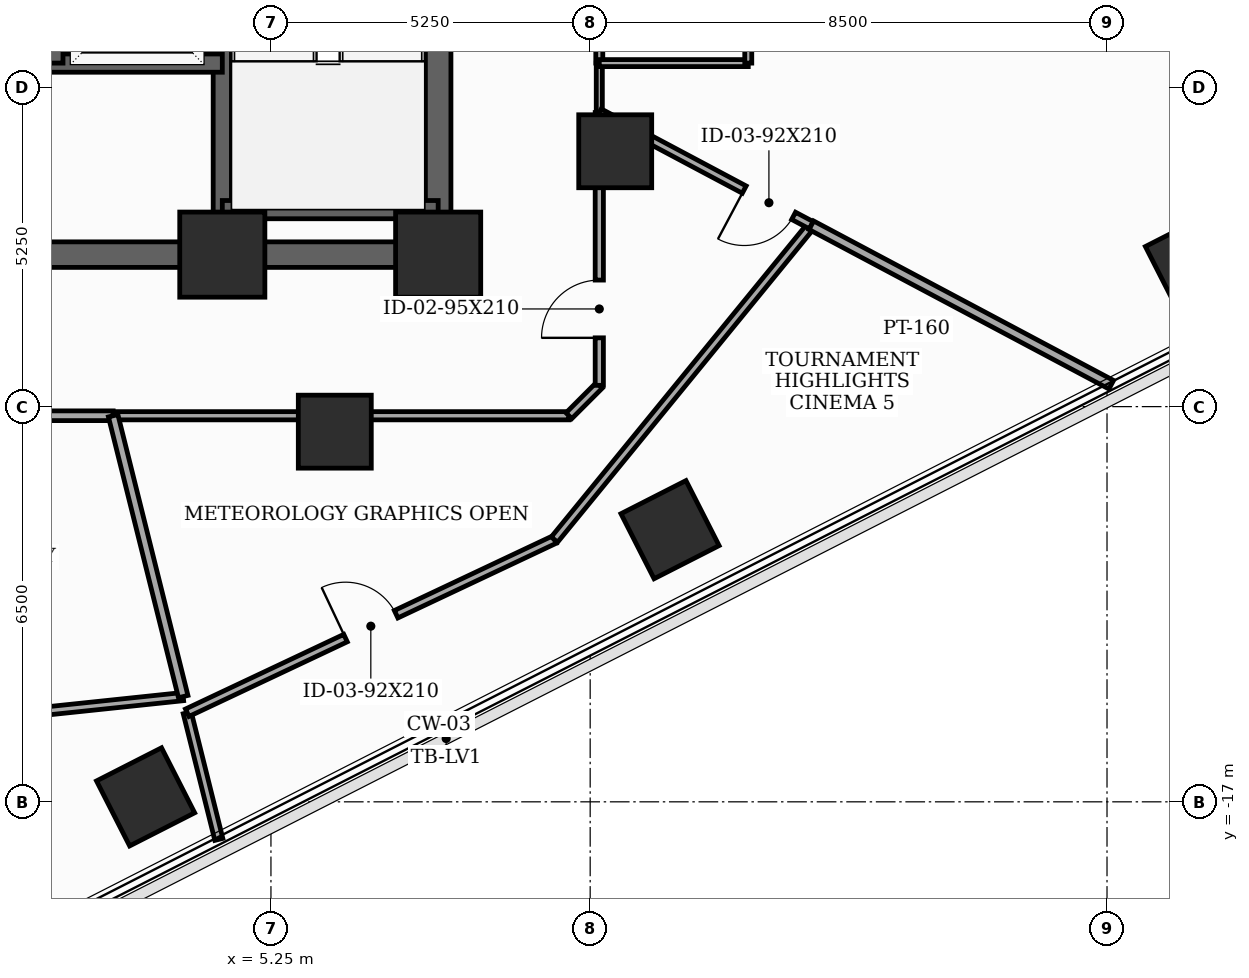
"""IFC4 building model, lengths in metres.
Left out: names, types, materials, properties, quantities, classifications, styles, units other than length and angle.
Written with IfcOpenShell. Run it as: python <this file> out.ifc"""

import sys

from ifc_helpers import new_model, si_unit, direction, frame, frame_2d, origin, origin_2d, place, context, subcontext, project, spatial, rectangle, extrude, element, fill, save


model = new_model("IFC4")
c1 = context("Model", 3, precision=1e-05, world=origin(), true_north=direction((0.0, 1.0)))
c2 = subcontext(c1, "Body", "Model", "MODEL_VIEW")
j1 = project(units=[si_unit("LENGTHUNIT", "METRE"), si_unit("PLANEANGLEUNIT", "RADIAN")], contexts=[c1])
p1 = place(None, origin())
s1 = spatial("IfcSite", under=j1, at=p1, CompositionType="ELEMENT")
p2 = place(p1, origin())
s2 = spatial("IfcBuilding", under=s1, at=p2, CompositionType="ELEMENT")
p3 = place(p2, frame((0.0, 0.0, 119.9)))
s3 = spatial("IfcBuildingStorey", under=s2, at=p3, CompositionType="ELEMENT", Elevation=119.9)
for number, where, z_axis, x_axis in (
    (1, (4.45, -8.0, 0.0), (0.0, 0.0, 1.0), (1.0, 0.0, 0.0)),
    (2, (8.0, -8.0, 0.0), (0.0, 0.0, 1.0), (1.0, 0.0, 0.0)),
):
    element("IfcColumn", number, at=place(p3, frame(where, z_axis=z_axis, x_axis=x_axis)), inside=s3, PredefinedType="COLUMN", context=c2, shape_type="SweptSolid", body=[
        extrude(rectangle(XDim=1.4, YDim=1.4, at=origin_2d()), origin(), (0.0, 0.0, 1.0), 3.7),
    ])
for number, where, z_axis, x_axis in (
    (3, (6.3, -10.912, 0.0), (0.0, 0.0, 1.0), (1.0, 0.0, 0.0)),
    (4, (10.912, -6.3, 0.0), (0.0, 0.0, 1.0), (1.0, 0.0, 0.0)),
    (5, (3.188, -16.918, 0.0), (0.0, 0.0, 1.0), (0.891, 0.454, 0.0)),
    (6, (11.813, -12.524, 0.0), (0.0, 0.0, 1.0), (0.891, 0.454, 0.0)),
    (7, (20.438, -8.129, 0.0), (0.0, 0.0, 1.0), (0.891, 0.454, 0.0)),
):
    element("IfcColumn", number, at=place(p3, frame(where, z_axis=z_axis, x_axis=x_axis)), inside=s3, PredefinedType="COLUMN", context=c2, shape_type="SweptSolid", body=[
        extrude(rectangle(XDim=1.2, YDim=1.2, at=origin_2d()), origin(), (0.0, 0.0, 1.0), 3.7),
    ])
p4 = place(p3, frame((8.0, -8.0, 0.0), z_axis=(0.0, 0.0, 1.0), x_axis=(0.0, 1.0, 0.0)))
e8 = element("IfcWall", 8, at=p4, inside=s3, PredefinedType="SHEAR", context=c2, shape_type="SweptSolid", body=[
    extrude(rectangle(XDim=16.0, YDim=0.42, at=frame_2d((8.0, 0.0))), origin(), (0.0, 0.0, 1.0), 3.5),
])
p5 = place(p4, frame((9.6, 0.0, 0.0)))
e9 = element("IfcOpeningElement", 9, at=p5, cuts=e8, PredefinedType="OPENING", context=c2, shape_type="SweptSolid", body=[
    extrude(rectangle(XDim=1.05, YDim=2.15, at=frame_2d((0.525, 1.075))), frame((0.0, 0.22, 0.0), z_axis=(0.0, -1.0, 0.0), x_axis=(1.0, 0.0, 0.0)), (0.0, 0.0, 1.0), 0.44),
])
p6 = place(p4, frame((14.229, 0.0, 0.0)))
e10 = element("IfcOpeningElement", 10, at=p6, cuts=e8, PredefinedType="OPENING", context=c2, shape_type="SweptSolid", body=[
    extrude(rectangle(XDim=0.85, YDim=2.02, at=frame_2d((0.425, 1.01))), frame((0.0, 0.22, 0.0), z_axis=(0.0, -1.0, 0.0), x_axis=(1.0, 0.0, 0.0)), (0.0, 0.0, 1.0), 0.44),
])
p7 = place(p3, frame((-8.0, -8.0, 0.0), z_axis=(0.0, 0.0, 1.0), x_axis=(1.0, 0.0, 0.0)))
e11 = element("IfcWall", 11, at=p7, inside=s3, PredefinedType="SHEAR", context=c2, shape_type="SweptSolid", body=[
    extrude(rectangle(XDim=16.0, YDim=0.42, at=frame_2d((8.0, 0.0))), origin(), (0.0, 0.0, 1.0), 3.5),
])
p8 = place(p7, frame((7.52, 0.0, 0.0)))
e12 = element("IfcOpeningElement", 12, at=p8, cuts=e11, PredefinedType="OPENING", context=c2, shape_type="SweptSolid", body=[
    extrude(rectangle(XDim=0.95, YDim=2.1, at=frame_2d((0.475, 1.05))), frame((0.0, 0.22, 0.0), z_axis=(0.0, -1.0, 0.0), x_axis=(1.0, 0.0, 0.0)), (0.0, 0.0, 1.0), 0.44),
])
p9 = place(p3, frame((4.45, -7.79, 0.0), z_axis=(0.0, 0.0, 1.0), x_axis=(0.0, 1.0, 0.0)))
e13 = element("IfcWall", 13, at=p9, inside=s3, PredefinedType="SHEAR", context=c2, shape_type="SweptSolid", body=[
    extrude(rectangle(XDim=15.58, YDim=0.3, at=frame_2d((7.79, 0.0))), origin(), (0.0, 0.0, 1.0), 3.5),
])
p10 = place(p3, frame((4.45, -7.26, 0.0), z_axis=(0.0, 0.0, 1.0), x_axis=(1.0, 0.0, 0.0)))
e14 = element("IfcWall", 14, at=p10, inside=s3, PredefinedType="SHEAR", context=c2, shape_type="SweptSolid", body=[
    extrude(rectangle(XDim=3.55, YDim=0.3, at=frame_2d((1.775, 0.0))), origin(), (0.0, 0.0, 1.0), 3.5),
])
p11 = place(p3, frame((-4.45, -4.85, 0.0), z_axis=(0.0, 0.0, 1.0), x_axis=(1.0, 0.0, 0.0)))
e15 = element("IfcWall", 15, at=p11, inside=s3, PredefinedType="SHEAR", context=c2, shape_type="SweptSolid", body=[
    extrude(rectangle(XDim=8.9, YDim=0.3, at=frame_2d((4.45, 0.0))), origin(), (0.0, 0.0, 1.0), 3.5),
])
p12 = place(p3, frame((1.68, -4.85, 0.0), z_axis=(0.0, 0.0, 1.0), x_axis=(0.0, 1.0, 0.0)))
e16 = element("IfcWall", 16, at=p12, inside=s3, PredefinedType="SHEAR", context=c2, shape_type="SweptSolid", body=[
    extrude(rectangle(XDim=12.64, YDim=0.3, at=frame_2d((6.32, 0.0))), origin(), (0.0, 0.0, 1.0), 3.5),
])
p13 = place(p12, frame((0.55, 0.0, 0.0)))
e17 = element("IfcOpeningElement", 17, at=p13, cuts=e16, PredefinedType="OPENING", context=c2, shape_type="SweptSolid", body=[
    extrude(rectangle(XDim=1.1, YDim=2.1, at=frame_2d((0.55, 1.05))), frame((0.0, 0.16, 0.0), z_axis=(0.0, -1.0, 0.0), x_axis=(1.0, 0.0, 0.0)), (0.0, 0.0, 1.0), 0.32),
])
p14 = place(p12, frame((2.65, 0.0, 0.0)))
e18 = element("IfcOpeningElement", 18, at=p14, cuts=e16, PredefinedType="OPENING", context=c2, shape_type="SweptSolid", body=[
    extrude(rectangle(XDim=1.1, YDim=2.1, at=frame_2d((0.55, 1.05))), frame((0.0, 0.16, 0.0), z_axis=(0.0, -1.0, 0.0), x_axis=(1.0, 0.0, 0.0)), (0.0, 0.0, 1.0), 0.32),
])
p15 = place(p12, frame((4.75, 0.0, 0.0)))
e19 = element("IfcOpeningElement", 19, at=p15, cuts=e16, PredefinedType="OPENING", context=c2, shape_type="SweptSolid", body=[
    extrude(rectangle(XDim=1.1, YDim=2.1, at=frame_2d((0.55, 1.05))), frame((0.0, 0.16, 0.0), z_axis=(0.0, -1.0, 0.0), x_axis=(1.0, 0.0, 0.0)), (0.0, 0.0, 1.0), 0.32),
])
p16 = place(p12, frame((6.85, 0.0, 0.0)))
e20 = element("IfcOpeningElement", 20, at=p16, cuts=e16, PredefinedType="OPENING", context=c2, shape_type="SweptSolid", body=[
    extrude(rectangle(XDim=1.1, YDim=2.1, at=frame_2d((0.55, 1.05))), frame((0.0, 0.16, 0.0), z_axis=(0.0, -1.0, 0.0), x_axis=(1.0, 0.0, 0.0)), (0.0, 0.0, 1.0), 0.32),
])
p17 = place(p12, frame((8.95, 0.0, 0.0)))
e21 = element("IfcOpeningElement", 21, at=p17, cuts=e16, PredefinedType="OPENING", context=c2, shape_type="SweptSolid", body=[
    extrude(rectangle(XDim=1.1, YDim=2.1, at=frame_2d((0.55, 1.05))), frame((0.0, 0.16, 0.0), z_axis=(0.0, -1.0, 0.0), x_axis=(1.0, 0.0, 0.0)), (0.0, 0.0, 1.0), 0.32),
])
p18 = place(p12, frame((11.05, 0.0, 0.0)))
e22 = element("IfcOpeningElement", 22, at=p18, cuts=e16, PredefinedType="OPENING", context=c2, shape_type="SweptSolid", body=[
    extrude(rectangle(XDim=1.1, YDim=2.1, at=frame_2d((0.55, 1.05))), frame((0.0, 0.16, 0.0), z_axis=(0.0, -1.0, 0.0), x_axis=(1.0, 0.0, 0.0)), (0.0, 0.0, 1.0), 0.32),
])
p19 = place(p3, frame((-8.936, -10.65, 0.0), z_axis=(0.0, 0.0, 1.0), x_axis=(1.0, 0.0, 0.0)))
e23 = element("IfcWall", 23, at=p19, inside=s3, PredefinedType="PARTITIONING", context=c2, shape_type="SweptSolid", body=[
    extrude(rectangle(XDim=11.591, YDim=0.16, at=frame_2d((5.795, 0.0))), origin(), (0.0, 0.0, 1.0), 2.785),
])
p20 = place(p19, frame((5.295, 0.0, 0.0)))
e24 = element("IfcOpeningElement", 24, at=p20, cuts=e23, PredefinedType="OPENING", context=c2, shape_type="SweptSolid", body=[
    extrude(rectangle(XDim=1.0, YDim=2.15, at=frame_2d((0.5, 1.075))), frame((0.0, 0.09, 0.0), z_axis=(0.0, -1.0, 0.0), x_axis=(1.0, 0.0, 0.0)), (0.0, 0.0, 1.0), 0.18),
])
p21 = place(p3, frame((2.655, -10.65, 0.0), z_axis=(0.0, 0.0, 1.0), x_axis=(1.0, 0.0, 0.0)))
e25 = element("IfcWall", 25, at=p21, inside=s3, PredefinedType="PARTITIONING", context=c2, shape_type="SweptSolid", body=[
    extrude(rectangle(XDim=7.495, YDim=0.135, at=frame_2d((3.748, 0.0))), origin(), (0.0, 0.0, 1.0), 2.785),
])
p22 = place(p3, frame((10.15, -10.65, 0.0), z_axis=(0.0, 0.0, 1.0), x_axis=(0.707106781187, 0.707106781187, 0.0)))
e26 = element("IfcWall", 26, at=p22, inside=s3, PredefinedType="PARTITIONING", context=c2, shape_type="SweptSolid", body=[
    extrude(rectangle(XDim=0.707, YDim=0.135, at=frame_2d((0.354, 0.0))), origin(), (0.0, 0.0, 1.0), 3.5),
])
p23 = place(p3, frame((10.65, -10.15, 0.0), z_axis=(0.0, 0.0, 1.0), x_axis=(0.0, 1.0, 0.0)))
e27 = element("IfcWall", 27, at=p23, inside=s3, PredefinedType="PARTITIONING", context=c2, shape_type="SweptSolid", body=[
    extrude(rectangle(XDim=4.487, YDim=0.135, at=frame_2d((2.243, 0.0))), origin(), (0.0, 0.0, 1.0), 2.785),
])
p24 = place(p23, frame((0.781, 0.0, 0.0)))
e28 = element("IfcOpeningElement", 28, at=p24, cuts=e27, PredefinedType="OPENING", context=c2, shape_type="SweptSolid", body=[
    extrude(rectangle(XDim=0.95, YDim=2.1, at=frame_2d((0.475, 1.05))), frame((0.0, 0.077, 0.0), z_axis=(0.0, -1.0, 0.0), x_axis=(1.0, 0.0, 0.0)), (0.0, 0.0, 1.0), 0.155),
])
p25 = place(p3, frame((10.65, -4.85, 0.0), z_axis=(0.0, 0.0, 1.0), x_axis=(0.0, 1.0, 0.0)))
e29 = element("IfcWall", 29, at=p25, inside=s3, PredefinedType="PARTITIONING", context=c2, shape_type="SweptSolid", body=[
    extrude(rectangle(XDim=2.4, YDim=0.115, at=frame_2d((1.2, 0.0))), origin(), (0.0, 0.0, 1.0), 3.5),
])
p26 = place(p25, frame((0.74, 0.0, 0.0)))
e30 = element("IfcOpeningElement", 30, at=p26, cuts=e29, PredefinedType="OPENING", context=c2, shape_type="SweptSolid", body=[
    extrude(rectangle(XDim=0.92, YDim=2.1, at=frame_2d((0.46, 1.05))), frame((0.0, 0.067, 0.0), z_axis=(0.0, -1.0, 0.0), x_axis=(1.0, 0.0, 0.0)), (0.0, 0.0, 1.0), 0.135),
])
p27 = place(p3, frame((10.65, -5.663, 0.0), z_axis=(0.0, 0.0, 1.0), x_axis=(0.0, 1.0, 0.0)))
e31 = element("IfcWall", 31, at=p27, inside=s3, PredefinedType="MOVABLE", context=c2, shape_type="SweptSolid", body=[
    extrude(rectangle(XDim=0.813, YDim=0.1, at=frame_2d((0.406, 0.0))), origin(), (0.0, 0.0, 1.0), 3.5),
])
p28 = place(p3, frame((3.807, -15.269, 0.0), z_axis=(0.0, 0.0, 1.0), x_axis=(-0.994513256503, -0.104610623932, 0.0)))
e32 = element("IfcWall", 32, at=p28, inside=s3, PredefinedType="PARTITIONING", context=c2, shape_type="SweptSolid", body=[
    extrude(rectangle(XDim=4.798, YDim=0.135, at=frame_2d((2.399, 0.0))), origin(), (0.0, 0.0, 1.0), 2.885),
])
p29 = place(p3, frame((4.393, -17.618, 0.0), z_axis=(0.0, 0.0, 1.0), x_axis=(-0.242107483306, 0.970249435211, 0.0)))
e33 = element("IfcWall", 33, at=p29, inside=s3, PredefinedType="PARTITIONING", context=c2, shape_type="SweptSolid", body=[
    extrude(rectangle(XDim=2.147, YDim=0.135, at=frame_2d((1.073, 0.0))), origin(), (0.0, 0.0, 1.0), 2.985),
])
p30 = place(p3, frame((3.807, -15.269, 0.0), z_axis=(0.0, 0.0, 1.0), x_axis=(-0.241956377954, 0.970287128209, 0.0)))
e34 = element("IfcWall", 34, at=p30, inside=s3, PredefinedType="PARTITIONING", context=c2, shape_type="SweptSolid", body=[
    extrude(rectangle(XDim=4.76, YDim=0.16, at=frame_2d((2.38, 0.0))), origin(), (0.0, 0.0, 1.0), 2.785),
])
p31 = place(p3, frame((3.873, -15.535, 0.0), z_axis=(0.0, 0.0, 1.0), x_axis=(0.904472849066, 0.426531200855, 0.0)))
e35 = element("IfcWall", 35, at=p31, inside=s3, PredefinedType="PARTITIONING", context=c2, shape_type="SweptSolid", body=[
    extrude(rectangle(XDim=6.677, YDim=0.135, at=frame_2d((3.338, 0.0))), origin(), (0.0, 0.0, 1.0), 3.5),
])
p32 = place(p31, frame((2.878, 0.0, 0.0)))
e36 = element("IfcOpeningElement", 36, at=p32, cuts=e35, PredefinedType="OPENING", context=c2, shape_type="SweptSolid", body=[
    extrude(rectangle(XDim=0.92, YDim=2.1, at=frame_2d((0.46, 1.05))), frame((0.0, 0.077, 0.0), z_axis=(0.0, -1.0, 0.0), x_axis=(1.0, 0.0, 0.0)), (0.0, 0.0, 1.0), 0.155),
])
p33 = place(p3, frame((9.912, -12.687, 0.0), z_axis=(0.0, 0.0, 1.0), x_axis=(0.632781686385, 0.774330250846, 0.0)))
e37 = element("IfcWall", 37, at=p33, inside=s3, PredefinedType="PARTITIONING", context=c2, shape_type="SweptSolid", body=[
    extrude(rectangle(XDim=6.677, YDim=0.135, at=frame_2d((3.338, 0.0))), origin(), (0.0, 0.0, 1.0), 2.885),
])
p34 = place(p3, frame((14.137, -7.517, 0.0), z_axis=(0.0, 0.0, 1.0), x_axis=(-0.882957991608, 0.46945200506, 0.0)))
e38 = element("IfcWall", 38, at=p34, inside=s3, PredefinedType="PARTITIONING", context=c2, shape_type="SweptSolid", body=[
    extrude(rectangle(XDim=3.949, YDim=0.135, at=frame_2d((1.975, 0.0))), origin(), (0.0, 0.0, 1.0), 2.785),
])
p35 = place(p34, frame((0.33, 0.0, 0.0)))
e39 = element("IfcOpeningElement", 39, at=p35, cuts=e38, PredefinedType="OPENING", context=c2, shape_type="SweptSolid", body=[
    extrude(rectangle(XDim=0.92, YDim=2.1, at=frame_2d((0.46, 1.05))), frame((0.0, 0.077, 0.0), z_axis=(0.0, -1.0, 0.0), x_axis=(1.0, 0.0, 0.0)), (0.0, 0.0, 1.0), 0.155),
])
p36 = place(p3, frame((19.07, -10.14, 0.0), z_axis=(0.0, 0.0, 1.0), x_axis=(-0.882959500857, 0.469449166413, 0.0)))
e40 = element("IfcWall", 40, at=p36, inside=s3, PredefinedType="PARTITIONING", context=c2, shape_type="SweptSolid", body=[
    extrude(rectangle(XDim=5.586, YDim=0.16, at=frame_2d((2.793, 0.0))), origin(), (0.0, 0.0, 1.0), 2.985),
])
p37 = place(p3, frame((10.65, -4.85, 0.0), z_axis=(0.0, 0.0, 1.0), x_axis=(1.0, 0.0, 0.0)))
e41 = element("IfcWall", 41, at=p37, inside=s3, PredefinedType="PARTITIONING", context=c2, shape_type="SweptSolid", body=[
    extrude(rectangle(XDim=2.45, YDim=0.115, at=frame_2d((1.225, 0.0))), origin(), (0.0, 0.0, 1.0), 2.785),
])
p38 = place(p3, frame((13.1, -4.85, 0.0), z_axis=(0.0, 0.0, 1.0), x_axis=(0.0, 1.0, 0.0)))
e42 = element("IfcWall", 42, at=p38, inside=s3, PredefinedType="PARTITIONING", context=c2, shape_type="SweptSolid", body=[
    extrude(rectangle(XDim=2.4, YDim=0.115, at=frame_2d((1.2, 0.0))), origin(), (0.0, 0.0, 1.0), 3.5),
])
p39 = place(p24, origin())
e43 = element("IfcDoor", 43, at=p39, inside=s3, OperationType="SINGLE_SWING_LEFT", PredefinedType="DOOR", context=c2, shape_type="SweptSolid", body=[
    extrude(rectangle(XDim=0.95, YDim=2.1, at=frame_2d((0.475, 1.05))), frame((0.0, 0.025, 0.0), z_axis=(0.0, -1.0, 0.0), x_axis=(1.0, 0.0, 0.0)), (0.0, 0.0, 1.0), 0.05),
])
fill(e28, e43)
p40 = place(p32, origin())
e44 = element("IfcDoor", 44, at=p40, inside=s3, OperationType="SINGLE_SWING_LEFT", PredefinedType="DOOR", context=c2, shape_type="SweptSolid", body=[
    extrude(rectangle(XDim=0.92, YDim=2.1, at=frame_2d((0.46, 1.05))), frame((0.0, 0.025, 0.0), z_axis=(0.0, -1.0, 0.0), x_axis=(1.0, 0.0, 0.0)), (0.0, 0.0, 1.0), 0.05),
])
fill(e36, e44)
p41 = place(p35, origin())
e45 = element("IfcDoor", 45, at=p41, inside=s3, OperationType="SINGLE_SWING_RIGHT", PredefinedType="DOOR", context=c2, shape_type="SweptSolid", body=[
    extrude(rectangle(XDim=0.92, YDim=2.1, at=frame_2d((0.46, 1.05))), frame((0.0, 0.025, 0.0), z_axis=(0.0, -1.0, 0.0), x_axis=(1.0, 0.0, 0.0)), (0.0, 0.0, 1.0), 0.05),
])
fill(e39, e45)
save(model, sys.argv[1])
